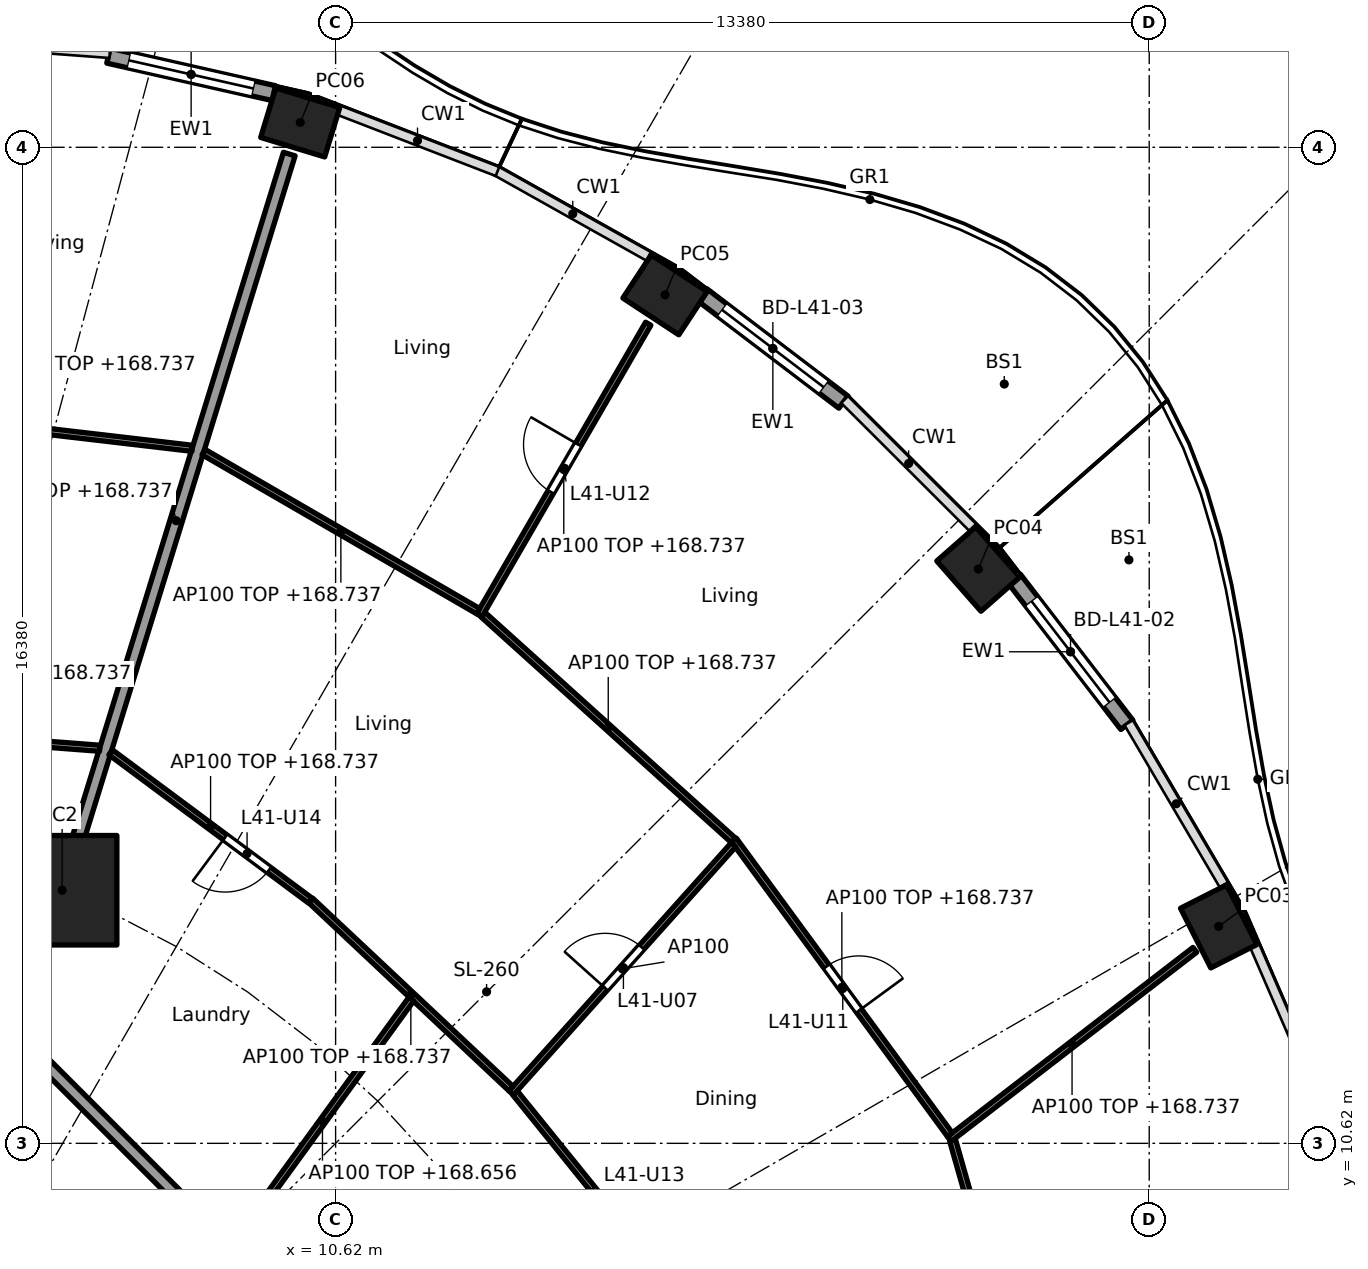
"""IFC4 building model, lengths in metres.
Left out: names, types, materials, properties, quantities, classifications, styles, units other than length and angle.
Written with IfcOpenShell. Run it as: python <this file> out.ifc"""

import sys

from ifc_helpers import new_model, si_unit, direction, frame, frame_2d, origin, origin_2d, place, context, subcontext, project, spatial, rectangle, hollow_rectangle, extrude, element, fill, save


model = new_model("IFC4")
c1 = context("Model", 3, precision=1e-05, world=origin(), true_north=direction((0.0, 1.0)))
c2 = subcontext(c1, "Body", "Model", "MODEL_VIEW")
j1 = project(units=[si_unit("LENGTHUNIT", "METRE"), si_unit("PLANEANGLEUNIT", "RADIAN")], contexts=[c1])
p1 = place(None, origin())
s1 = spatial("IfcSite", under=j1, at=p1, CompositionType="ELEMENT")
p2 = place(p1, origin())
s2 = spatial("IfcBuilding", under=s1, at=p2, CompositionType="ELEMENT")
p3 = place(p2, frame((0.0, 0.0, 165.9)))
s3 = spatial("IfcBuildingStorey", under=s2, at=p3, CompositionType="ELEMENT", Elevation=165.9)
for number, where, z_axis, x_axis in (
    (1, (25.142, 14.188, -0.26), (0.0, 0.0, 1.0), (-0.452, 0.892, 0.0)),
    (2, (21.189, 20.064, -0.26), (0.0, 0.0, 1.0), (-0.66, 0.751, 0.0)),
    (3, (16.038, 24.573, -0.26), (0.0, 0.0, 1.0), (-0.836, 0.549, 0.0)),
    (4, (10.038, 27.408, -0.26), (0.0, 0.0, 1.0), (-0.957, 0.292, 0.0)),
):
    element("IfcColumn", number, at=place(p3, frame(where, z_axis=z_axis, x_axis=x_axis)), inside=s3, PredefinedType="COLUMN", context=c2, shape_type="SweptSolid", body=[
        extrude(hollow_rectangle(XDim=1.1, YDim=0.85, WallThickness=0.036, at=origin_2d()), origin(), (0.0, 0.0, 1.0), 3.96),
    ])
p4 = place(p3, frame((6.123, 14.782, 0.0), z_axis=(0.0, 0.0, 1.0), x_axis=(1.0, 0.0, 0.0)))
e5 = element("IfcColumn", 5, at=p4, inside=s3, PredefinedType="COLUMN", context=c2, shape_type="SweptSolid", body=[
    extrude(rectangle(XDim=1.8, YDim=1.8, at=origin_2d()), origin(), (0.0, 0.0, 1.0), 3.7),
])
p5 = place(p3, frame((21.78, 19.906, 0.0), z_axis=(0.0, 0.0, 1.0), x_axis=(0.610437428894, -0.79206448311, 0.0)))
e6 = element("IfcWall", 6, at=p5, inside=s3, PredefinedType="SOLIDWALL", context=c2, shape_type="SweptSolid", body=[
    extrude(rectangle(XDim=3.035, YDim=0.25, at=frame_2d((1.518, 0.0))), origin(), (0.0, 0.0, 1.0), 3.44),
])
p6 = place(p5, frame((0.468, 0.0, 0.0)))
e7 = element("IfcOpeningElement", 7, at=p6, cuts=e6, PredefinedType="OPENING", context=c2, shape_type="SweptSolid", body=[
    extrude(rectangle(XDim=2.1, YDim=2.4, at=frame_2d((1.05, 1.2))), frame((0.0, 0.135, 0.0), z_axis=(0.0, -1.0, 0.0), x_axis=(1.0, 0.0, 0.0)), (0.0, 0.0, 1.0), 0.27),
])
p7 = place(p3, frame((16.65, 24.574, 0.0), z_axis=(0.0, 0.0, 1.0), x_axis=(0.796055733703, -0.60522332146, 0.0)))
e8 = element("IfcWall", 8, at=p7, inside=s3, PredefinedType="SOLIDWALL", context=c2, shape_type="SweptSolid", body=[
    extrude(rectangle(XDim=2.917, YDim=0.25, at=frame_2d((1.458, 0.0))), origin(), (0.0, 0.0, 1.0), 3.44),
])
p8 = place(p7, frame((0.408, 0.0, 0.0)))
e9 = element("IfcOpeningElement", 9, at=p8, cuts=e8, PredefinedType="OPENING", context=c2, shape_type="SweptSolid", body=[
    extrude(rectangle(XDim=2.1, YDim=2.4, at=frame_2d((1.05, 1.2))), frame((0.0, 0.135, 0.0), z_axis=(0.0, -1.0, 0.0), x_axis=(1.0, 0.0, 0.0)), (0.0, 0.0, 1.0), 0.27),
])
p9 = place(p3, frame((6.885, 28.506, 0.0), z_axis=(0.0, 0.0, 1.0), x_axis=(0.975324329911, -0.220776926974, 0.0)))
e10 = element("IfcWall", 10, at=p9, inside=s3, PredefinedType="SOLIDWALL", context=c2, shape_type="SweptSolid", body=[
    extrude(rectangle(XDim=2.788, YDim=0.25, at=frame_2d((1.394, 0.0))), origin(), (0.0, 0.0, 1.0), 3.44),
])
p10 = place(p9, frame((0.344, 0.0, 0.0)))
e11 = element("IfcOpeningElement", 11, at=p10, cuts=e10, PredefinedType="OPENING", context=c2, shape_type="SweptSolid", body=[
    extrude(rectangle(XDim=2.1, YDim=2.4, at=frame_2d((1.05, 1.2))), frame((0.0, 0.135, 0.0), z_axis=(0.0, -1.0, 0.0), x_axis=(1.0, 0.0, 0.0)), (0.0, 0.0, 1.0), 0.27),
])
p11 = place(p3, frame((9.988, 4.613, 0.0), z_axis=(0.0, 0.0, 1.0), x_axis=(-0.707106781187, 0.707106781187, 0.0)))
e12 = element("IfcWall", 12, at=p11, inside=s3, PredefinedType="SHEAR", context=c2, shape_type="SweptSolid", body=[
    extrude(rectangle(XDim=7.602, YDim=0.6, at=frame_2d((3.801, 0.0))), origin(), (0.0, 0.0, 1.0), 3.44),
])
p12 = place(p11, frame((3.201, 0.0, 0.0)))
e13 = element("IfcOpeningElement", 13, at=p12, cuts=e12, PredefinedType="OPENING", context=c2, shape_type="SweptSolid", body=[
    extrude(rectangle(XDim=1.2, YDim=2.1, at=frame_2d((0.6, 1.05))), frame((0.0, 0.31, 0.0), z_axis=(0.0, -1.0, 0.0), x_axis=(1.0, 0.0, 0.0)), (0.0, 0.0, 1.0), 0.62),
])
p13 = place(p3, frame((5.243, 12.657, 0.0), z_axis=(0.0, 0.0, 1.0), x_axis=(0.382747093259, 0.923853160736, 0.0)))
e14 = element("IfcWall", 14, at=p13, inside=s3, PredefinedType="PARTITIONING", context=c2, shape_type="SweptSolid", body=[
    extrude(rectangle(XDim=2.2, YDim=0.2, at=frame_2d((1.1, 0.0))), origin(), (0.0, 0.0, 1.0), 3.44),
])
p14 = place(p3, frame((6.138, 14.83, 0.0), z_axis=(0.0, 0.0, 1.0), x_axis=(0.294818517221, 0.955553264818, 0.0)))
e15 = element("IfcWall", 15, at=p14, inside=s3, PredefinedType="PARTITIONING", context=c2, shape_type="SweptSolid", body=[
    extrude(rectangle(XDim=12.619, YDim=0.2, at=frame_2d((6.31, 0.0))), origin(), (0.0, 0.0, 1.0), 2.837),
])
p15 = place(p3, frame((12.635, 5.134, 0.0), z_axis=(0.0, 0.0, 1.0), x_axis=(-0.707106781187, 0.707106781187, 0.0)))
e16 = element("IfcWall", 16, at=p15, inside=s3, PredefinedType="PARTITIONING", context=c2, shape_type="SweptSolid", body=[
    extrude(rectangle(XDim=10.609, YDim=0.2, at=frame_2d((5.305, 0.0))), origin(), (0.0, 0.0, 1.0), 3.44),
])
p16 = place(p3, frame((22.189, 5.67, 0.0), z_axis=(0.0, 0.0, 1.0), x_axis=(-0.273815967041, 0.961782104322, 0.0)))
e17 = element("IfcWall", 17, at=p16, inside=s3, PredefinedType="PARTITIONING", context=c2, shape_type="SweptSolid", body=[
    extrude(rectangle(XDim=5.202, YDim=0.1, at=frame_2d((2.601, 0.0))), origin(), (0.0, 0.0, 1.0), 2.837),
])
p17 = place(p16, frame((2.151, 0.0, 0.0)))
e18 = element("IfcOpeningElement", 18, at=p17, cuts=e17, PredefinedType="OPENING", context=c2, shape_type="SweptSolid", body=[
    extrude(rectangle(XDim=0.9, YDim=2.1, at=frame_2d((0.45, 1.05))), frame((0.0, 0.06, 0.0), z_axis=(0.0, -1.0, 0.0), x_axis=(1.0, 0.0, 0.0)), (0.0, 0.0, 1.0), 0.12),
])
p18 = place(p3, frame((16.721, 7.553, 0.0), z_axis=(0.0, 0.0, 1.0), x_axis=(-0.628753513808, 0.777604667472, 0.0)))
e19 = element("IfcWall", 19, at=p18, inside=s3, PredefinedType="PARTITIONING", context=c2, shape_type="SweptSolid", body=[
    extrude(rectangle(XDim=5.007, YDim=0.1, at=frame_2d((2.504, 0.0))), origin(), (0.0, 0.0, 1.0), 2.837),
])
p19 = place(p18, frame((2.079, 0.0, 0.0)))
e20 = element("IfcOpeningElement", 20, at=p19, cuts=e19, PredefinedType="OPENING", context=c2, shape_type="SweptSolid", body=[
    extrude(rectangle(XDim=0.9, YDim=2.1, at=frame_2d((0.45, 1.05))), frame((0.0, 0.06, 0.0), z_axis=(0.0, -1.0, 0.0), x_axis=(1.0, 0.0, 0.0)), (0.0, 0.0, 1.0), 0.12),
])
p20 = place(p3, frame((20.712, 10.691, 0.0), z_axis=(0.0, 0.0, 1.0), x_axis=(0.79220362146, 0.610256849323, 0.0)))
e21 = element("IfcWall", 21, at=p20, inside=s3, PredefinedType="PARTITIONING", context=c2, shape_type="SweptSolid", body=[
    extrude(rectangle(XDim=5.098, YDim=0.1, at=frame_2d((2.549, 0.0))), origin(), (0.0, 0.0, 1.0), 2.837),
])
p21 = place(p3, frame((20.722, 10.762, 0.0), z_axis=(0.0, 0.0, 1.0), x_axis=(-0.591124135033, 0.806580595466, 0.0)))
e22 = element("IfcWall", 22, at=p21, inside=s3, PredefinedType="PARTITIONING", context=c2, shape_type="SweptSolid", body=[
    extrude(rectangle(XDim=6.01, YDim=0.1, at=frame_2d((3.005, 0.0))), origin(), (0.0, 0.0, 1.0), 2.837),
])
p22 = place(p21, frame((2.53, 0.0, 0.0)))
e23 = element("IfcOpeningElement", 23, at=p22, cuts=e22, PredefinedType="OPENING", context=c2, shape_type="SweptSolid", body=[
    extrude(rectangle(XDim=0.9, YDim=2.1, at=frame_2d((0.45, 1.05))), frame((0.0, 0.06, 0.0), z_axis=(0.0, -1.0, 0.0), x_axis=(1.0, 0.0, 0.0)), (0.0, 0.0, 1.0), 0.12),
])
p23 = place(p3, frame((13.507, 11.449, 0.0), z_axis=(0.0, 0.0, 1.0), x_axis=(0.667299792168, 0.744789223453, 0.0)))
e24 = element("IfcWall", 24, at=p23, inside=s3, PredefinedType="PARTITIONING", context=c2, shape_type="SweptSolid", body=[
    extrude(rectangle(XDim=5.482, YDim=0.1, at=frame_2d((2.741, 0.0))), origin(), (0.0, 0.0, 1.0), 3.44),
])
p24 = place(p23, frame((2.316, 0.0, 0.0)))
e25 = element("IfcOpeningElement", 25, at=p24, cuts=e24, PredefinedType="OPENING", context=c2, shape_type="SweptSolid", body=[
    extrude(rectangle(XDim=0.9, YDim=2.1, at=frame_2d((0.45, 1.05))), frame((0.0, 0.06, 0.0), z_axis=(0.0, -1.0, 0.0), x_axis=(1.0, 0.0, 0.0)), (0.0, 0.0, 1.0), 0.12),
])
p25 = place(p3, frame((13.504, 11.52, 0.0), z_axis=(0.0, 0.0, 1.0), x_axis=(-0.728883199496, 0.684638066055, 0.0)))
e26 = element("IfcWall", 26, at=p25, inside=s3, PredefinedType="PARTITIONING", context=c2, shape_type="SweptSolid", body=[
    extrude(rectangle(XDim=4.519, YDim=0.1, at=frame_2d((2.26, 0.0))), origin(), (0.0, 0.0, 1.0), 2.837),
])
p26 = place(p3, frame((17.162, 15.603, 0.0), z_axis=(0.0, 0.0, 1.0), x_axis=(-0.742790086539, 0.66952437397, 0.0)))
e27 = element("IfcWall", 27, at=p26, inside=s3, PredefinedType="PARTITIONING", context=c2, shape_type="SweptSolid", body=[
    extrude(rectangle(XDim=5.542, YDim=0.1, at=frame_2d((2.771, 0.0))), origin(), (0.0, 0.0, 1.0), 2.837),
])
p27 = place(p3, frame((8.943, 8.966, 0.0), z_axis=(0.0, 0.0, 1.0), x_axis=(0.587187896734, 0.809450661825, 0.0)))
e28 = element("IfcWall", 28, at=p27, inside=s3, PredefinedType="PARTITIONING", context=c2, shape_type="SweptSolid", body=[
    extrude(rectangle(XDim=4.975, YDim=0.1, at=frame_2d((2.487, 0.0))), origin(), (0.0, 0.0, 1.0), 2.756),
])
p28 = place(p3, frame((10.207, 14.61, 0.0), z_axis=(0.0, 0.0, 1.0), x_axis=(-0.802769141821, 0.596289950394, 0.0)))
e29 = element("IfcWall", 29, at=p28, inside=s3, PredefinedType="PARTITIONING", context=c2, shape_type="SweptSolid", body=[
    extrude(rectangle(XDim=4.092, YDim=0.1, at=frame_2d((2.046, 0.0))), origin(), (0.0, 0.0, 1.0), 2.837),
])
p29 = place(p28, frame((0.848, 0.0, 0.0)))
e30 = element("IfcOpeningElement", 30, at=p29, cuts=e29, PredefinedType="OPENING", context=c2, shape_type="SweptSolid", body=[
    extrude(rectangle(XDim=0.9, YDim=2.1, at=frame_2d((0.45, 1.05))), frame((0.0, 0.06, 0.0), z_axis=(0.0, -1.0, 0.0), x_axis=(1.0, 0.0, 0.0)), (0.0, 0.0, 1.0), 0.12),
])
p30 = place(p3, frame((12.983, 19.303, 0.0), z_axis=(0.0, 0.0, 1.0), x_axis=(0.501315846071, 0.865264365659, 0.0)))
e31 = element("IfcWall", 31, at=p30, inside=s3, PredefinedType="PARTITIONING", context=c2, shape_type="SweptSolid", body=[
    extrude(rectangle(XDim=5.542, YDim=0.1, at=frame_2d((2.771, 0.0))), origin(), (0.0, 0.0, 1.0), 2.837),
])
p31 = place(p30, frame((2.346, 0.0, 0.0)))
e32 = element("IfcOpeningElement", 32, at=p31, cuts=e31, PredefinedType="OPENING", context=c2, shape_type="SweptSolid", body=[
    extrude(rectangle(XDim=0.9, YDim=2.1, at=frame_2d((0.45, 1.05))), frame((0.0, 0.06, 0.0), z_axis=(0.0, -1.0, 0.0), x_axis=(1.0, 0.0, 0.0)), (0.0, 0.0, 1.0), 0.12),
])
p32 = place(p3, frame((12.965, 19.371, 0.0), z_axis=(0.0, 0.0, 1.0), x_axis=(-0.865286427811, 0.501277765163, 0.0)))
e33 = element("IfcWall", 33, at=p32, inside=s3, PredefinedType="PARTITIONING", context=c2, shape_type="SweptSolid", body=[
    extrude(rectangle(XDim=5.22, YDim=0.1, at=frame_2d((2.61, 0.0))), origin(), (0.0, 0.0, 1.0), 2.837),
])
p33 = place(p3, frame((6.741, 17.117, 0.0), z_axis=(0.0, 0.0, 1.0), x_axis=(-0.997078320723, 0.076386008825, 0.0)))
e34 = element("IfcWall", 34, at=p33, inside=s3, PredefinedType="PARTITIONING", context=c2, shape_type="SweptSolid", body=[
    extrude(rectangle(XDim=4.51, YDim=0.1, at=frame_2d((2.255, 0.0))), origin(), (0.0, 0.0, 1.0), 2.837),
])
p34 = place(p3, frame((8.262, 22.05, 0.0), z_axis=(0.0, 0.0, 1.0), x_axis=(-0.993250089265, 0.115992500516, 0.0)))
e35 = element("IfcWall", 35, at=p34, inside=s3, PredefinedType="PARTITIONING", context=c2, shape_type="SweptSolid", body=[
    extrude(rectangle(XDim=5.458, YDim=0.1, at=frame_2d((2.729, 0.0))), origin(), (0.0, 0.0, 1.0), 2.837),
])
p35 = place(p6, origin())
e36 = element("IfcDoor", 36, at=p35, inside=s3, OperationType="SLIDING_TO_LEFT", PredefinedType="DOOR", context=c2, shape_type="SweptSolid", body=[
    extrude(rectangle(XDim=2.1, YDim=2.4, at=frame_2d((1.05, 1.2))), frame((0.0, 0.025, 0.0), z_axis=(0.0, -1.0, 0.0), x_axis=(1.0, 0.0, 0.0)), (0.0, 0.0, 1.0), 0.05),
])
fill(e7, e36)
p36 = place(p8, origin())
e37 = element("IfcDoor", 37, at=p36, inside=s3, OperationType="SLIDING_TO_LEFT", PredefinedType="DOOR", context=c2, shape_type="SweptSolid", body=[
    extrude(rectangle(XDim=2.1, YDim=2.4, at=frame_2d((1.05, 1.2))), frame((0.0, 0.025, 0.0), z_axis=(0.0, -1.0, 0.0), x_axis=(1.0, 0.0, 0.0)), (0.0, 0.0, 1.0), 0.05),
])
fill(e9, e37)
p37 = place(p10, origin())
e38 = element("IfcDoor", 38, at=p37, inside=s3, OperationType="SLIDING_TO_LEFT", PredefinedType="DOOR", context=c2, shape_type="SweptSolid", body=[
    extrude(rectangle(XDim=2.1, YDim=2.4, at=frame_2d((1.05, 1.2))), frame((0.0, 0.025, 0.0), z_axis=(0.0, -1.0, 0.0), x_axis=(1.0, 0.0, 0.0)), (0.0, 0.0, 1.0), 0.05),
])
fill(e11, e38)
p38 = place(p24, origin())
e39 = element("IfcDoor", 39, at=p38, inside=s3, OperationType="SINGLE_SWING_LEFT", PredefinedType="DOOR", context=c2, shape_type="SweptSolid", body=[
    extrude(rectangle(XDim=0.9, YDim=2.1, at=frame_2d((0.45, 1.05))), frame((0.0, 0.025, 0.0), z_axis=(0.0, -1.0, 0.0), x_axis=(1.0, 0.0, 0.0)), (0.0, 0.0, 1.0), 0.05),
])
fill(e25, e39)
p39 = place(p22, frame((0.9, 0.0, 0.0), x_axis=(-1.0, 0.0, 0.0)))
e40 = element("IfcDoor", 40, at=p39, inside=s3, OperationType="SINGLE_SWING_RIGHT", PredefinedType="DOOR", context=c2, shape_type="SweptSolid", body=[
    extrude(rectangle(XDim=0.9, YDim=2.1, at=frame_2d((0.45, 1.05))), frame((0.0, 0.025, 0.0), z_axis=(0.0, -1.0, 0.0), x_axis=(1.0, 0.0, 0.0)), (0.0, 0.0, 1.0), 0.05),
])
fill(e23, e40)
p40 = place(p31, origin())
e41 = element("IfcDoor", 41, at=p40, inside=s3, OperationType="SINGLE_SWING_RIGHT", PredefinedType="DOOR", context=c2, shape_type="SweptSolid", body=[
    extrude(rectangle(XDim=0.9, YDim=2.1, at=frame_2d((0.45, 1.05))), frame((0.0, 0.025, 0.0), z_axis=(0.0, -1.0, 0.0), x_axis=(1.0, 0.0, 0.0)), (0.0, 0.0, 1.0), 0.05),
])
fill(e32, e41)
p41 = place(p19, origin())
e42 = element("IfcDoor", 42, at=p41, inside=s3, OperationType="SINGLE_SWING_LEFT", PredefinedType="DOOR", context=c2, shape_type="SweptSolid", body=[
    extrude(rectangle(XDim=0.9, YDim=2.1, at=frame_2d((0.45, 1.05))), frame((0.0, 0.025, 0.0), z_axis=(0.0, -1.0, 0.0), x_axis=(1.0, 0.0, 0.0)), (0.0, 0.0, 1.0), 0.05),
])
fill(e20, e42)
p42 = place(p29, origin())
e43 = element("IfcDoor", 43, at=p42, inside=s3, OperationType="SINGLE_SWING_RIGHT", PredefinedType="DOOR", context=c2, shape_type="SweptSolid", body=[
    extrude(rectangle(XDim=0.9, YDim=2.1, at=frame_2d((0.45, 1.05))), frame((0.0, 0.025, 0.0), z_axis=(0.0, -1.0, 0.0), x_axis=(1.0, 0.0, 0.0)), (0.0, 0.0, 1.0), 0.05),
])
fill(e30, e43)
save(model, sys.argv[1])
